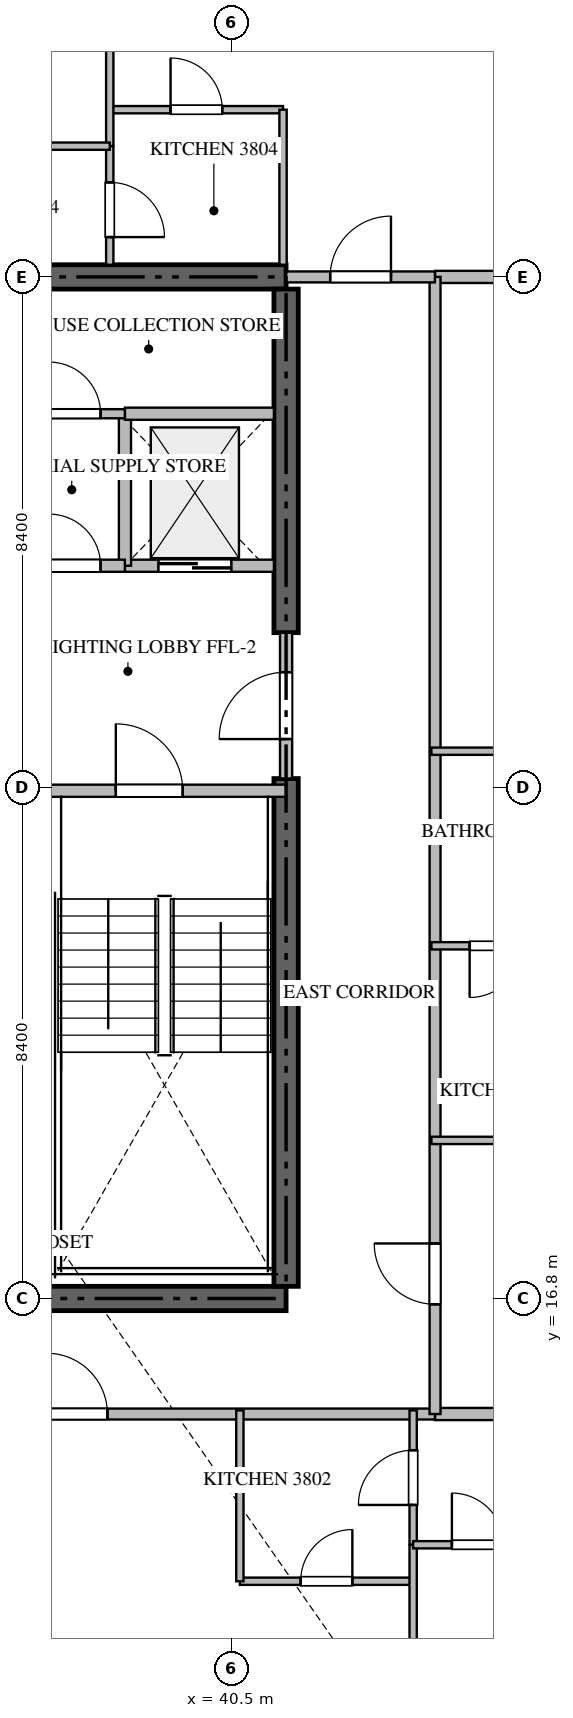
"""IFC4 building model, lengths in metres.
Left out: names, types, materials, properties, quantities, classifications, styles, units other than length and angle.
Written with IfcOpenShell. Run it as: python <this file> out.ifc"""

import sys

from ifc_helpers import new_model, si_unit, direction, frame, frame_2d, origin, place, context, subcontext, project, spatial, rectangle, extrude, source, transform, mapped, element, fill, save


model = new_model("IFC4")
c1 = context("Model", 3, precision=1e-05, world=origin(), true_north=direction((0.0, 1.0)))
c2 = subcontext(c1, "Body", "Model", "MODEL_VIEW")
j1 = project(units=[si_unit("LENGTHUNIT", "METRE"), si_unit("PLANEANGLEUNIT", "RADIAN")], contexts=[c1])
p1 = place(None, origin())
s1 = spatial("IfcSite", under=j1, at=p1, CompositionType="ELEMENT")
p2 = place(p1, origin())
s2 = spatial("IfcBuilding", under=s1, at=p2, CompositionType="ELEMENT")
p3 = place(p2, frame((0.0, 0.0, 153.9)))
s3 = spatial("IfcBuildingStorey", under=s2, at=p3, CompositionType="ELEMENT", Elevation=153.9)
for number, where, z_axis, x_axis in (
    (1, (23.4, 16.8, -0.26), (0.0, 0.0, 1.0), (1.0, 0.0, 0.0)),
    (2, (41.4, 33.6, -0.26), (0.0, 0.0, 1.0), (-1.0, 0.0, 0.0)),
):
    element("IfcWall", number, at=place(p3, frame(where, z_axis=z_axis, x_axis=x_axis)), inside=s3, PredefinedType="SHEAR", context=c2, shape_type="SweptSolid", body=[
        extrude(rectangle(XDim=18.0, YDim=0.4, at=frame_2d((9.0, 0.0))), origin(), (0.0, 0.0, 1.0), 3.748),
    ])
p4 = place(p3, frame((41.4, 17.0, -0.26), z_axis=(0.0, 0.0, 1.0), x_axis=(0.0, 1.0, 0.0)))
e3 = element("IfcWall", 3, at=p4, inside=s3, PredefinedType="SHEAR", context=c2, shape_type="SweptSolid", body=[
    extrude(rectangle(XDim=8.35, YDim=0.4, at=frame_2d((4.175, 0.0))), origin(), (0.0, 0.0, 1.0), 3.748),
])
p5 = place(p3, frame((41.4, 27.75, -0.26), z_axis=(0.0, 0.0, 1.0), x_axis=(0.0, 1.0, 0.0)))
e4 = element("IfcWall", 4, at=p5, inside=s3, PredefinedType="SHEAR", context=c2, shape_type="SweptSolid", body=[
    extrude(rectangle(XDim=5.65, YDim=0.4, at=frame_2d((2.825, 0.0))), origin(), (0.0, 0.0, 1.0), 3.748),
])
p6 = place(p3, frame((36.95, 25.15, 0.0), z_axis=(0.0, 0.0, 1.0), x_axis=(1.0, 0.0, 0.0)))
e5 = element("IfcWall", 5, at=p6, inside=s3, PredefinedType="STANDARD", context=c2, shape_type="SweptSolid", body=[
    extrude(rectangle(XDim=4.45, YDim=0.2, at=frame_2d((2.225, 0.0))), origin(), (0.0, 0.0, 1.0), 3.49),
])
p7 = place(p6, frame((1.65, 0.0, 0.0)))
e6 = element("IfcOpeningElement", 6, at=p7, cuts=e5, PredefinedType="OPENING", context=c2, shape_type="SweptSolid", body=[
    extrude(rectangle(XDim=1.1, YDim=2.15, at=frame_2d((0.55, 1.075))), frame((0.0, 0.11, 0.0), z_axis=(0.0, -1.0, 0.0), x_axis=(1.0, 0.0, 0.0)), (0.0, 0.0, 1.0), 0.22),
])
p8 = place(p3, frame((38.75, 28.85, 0.0), z_axis=(0.0, 0.0, 1.0), x_axis=(1.0, 0.0, 0.0)))
e7 = element("IfcWall", 7, at=p8, inside=s3, PredefinedType="STANDARD", context=c2, shape_type="SweptSolid", body=[
    extrude(rectangle(XDim=2.45, YDim=0.2, at=frame_2d((1.225, 0.0))), origin(), (0.0, 0.0, 1.0), 3.49),
])
p9 = place(p8, frame((0.55, 0.0, 0.0)))
e8 = element("IfcOpeningElement", 8, at=p9, cuts=e7, PredefinedType="OPENING", context=c2, shape_type="SweptSolid", body=[
    extrude(rectangle(XDim=1.2, YDim=2.2, at=frame_2d((0.6, 1.1))), frame((0.0, 0.11, 0.0), z_axis=(0.0, -1.0, 0.0), x_axis=(1.0, 0.0, 0.0)), (0.0, 0.0, 1.0), 0.22),
])
p10 = place(p3, frame((38.75, 28.85, 0.0), z_axis=(0.0, 0.0, 1.0), x_axis=(0.0, 1.0, 0.0)))
e9 = element("IfcWall", 9, at=p10, inside=s3, PredefinedType="STANDARD", context=c2, shape_type="SweptSolid", body=[
    extrude(rectangle(XDim=2.5, YDim=0.2, at=frame_2d((1.25, 0.0))), origin(), (0.0, 0.0, 1.0), 3.49),
])
p11 = place(p3, frame((38.75, 31.35, 0.0), z_axis=(0.0, 0.0, 1.0), x_axis=(1.0, 0.0, 0.0)))
e10 = element("IfcWall", 10, at=p11, inside=s3, PredefinedType="STANDARD", context=c2, shape_type="SweptSolid", body=[
    extrude(rectangle(XDim=2.45, YDim=0.2, at=frame_2d((1.225, 0.0))), origin(), (0.0, 0.0, 1.0), 3.49),
])
p12 = place(p3, frame((37.1, 28.85, 0.0), z_axis=(0.0, 0.0, 1.0), x_axis=(1.0, 0.0, 0.0)))
e11 = element("IfcWall", 11, at=p12, inside=s3, PredefinedType="STANDARD", context=c2, shape_type="SweptSolid", body=[
    extrude(rectangle(XDim=1.648, YDim=0.2, at=frame_2d((0.824, 0.0))), origin(), (0.0, 0.0, 1.0), 3.49),
])
p13 = place(p12, frame((0.399, 0.0, 0.0)))
e12 = element("IfcOpeningElement", 12, at=p13, cuts=e11, PredefinedType="OPENING", context=c2, shape_type="SweptSolid", body=[
    extrude(rectangle(XDim=0.85, YDim=2.1, at=frame_2d((0.425, 1.05))), frame((0.0, 0.11, 0.0), z_axis=(0.0, -1.0, 0.0), x_axis=(1.0, 0.0, 0.0)), (0.0, 0.0, 1.0), 0.22),
])
p14 = place(p3, frame((41.4, 25.352, 0.0), z_axis=(0.0, 0.0, 1.0), x_axis=(0.0, 1.0, 0.0)))
e13 = element("IfcWall", 13, at=p14, inside=s3, PredefinedType="STANDARD", context=c2, shape_type="SweptSolid", body=[
    extrude(rectangle(XDim=2.396, YDim=0.2, at=frame_2d((1.198, 0.0))), origin(), (0.0, 0.0, 1.0), 3.49),
])
p15 = place(p14, frame((0.648, 0.0, 0.0)))
e14 = element("IfcOpeningElement", 14, at=p15, cuts=e13, PredefinedType="OPENING", context=c2, shape_type="SweptSolid", body=[
    extrude(rectangle(XDim=1.1, YDim=2.15, at=frame_2d((0.55, 1.075))), frame((0.0, 0.11, 0.0), z_axis=(0.0, -1.0, 0.0), x_axis=(1.0, 0.0, 0.0)), (0.0, 0.0, 1.0), 0.22),
])
p16 = place(p3, frame((37.1, 31.35, 0.0), z_axis=(0.0, 0.0, 1.0), x_axis=(1.0, 0.0, 0.0)))
e15 = element("IfcWall", 15, at=p16, inside=s3, PredefinedType="PARTITIONING", context=c2, shape_type="SweptSolid", body=[
    extrude(rectangle(XDim=1.648, YDim=0.15, at=frame_2d((0.824, 0.0))), origin(), (0.0, 0.0, 1.0), 3.49),
])
p17 = place(p16, frame((0.399, 0.0, 0.0)))
e16 = element("IfcOpeningElement", 16, at=p17, cuts=e15, PredefinedType="OPENING", context=c2, shape_type="SweptSolid", body=[
    extrude(rectangle(XDim=0.85, YDim=2.1, at=frame_2d((0.425, 1.05))), frame((0.0, 0.085, 0.0), z_axis=(0.0, -1.0, 0.0), x_axis=(1.0, 0.0, 0.0)), (0.0, 0.0, 1.0), 0.17),
])
for number, where, z_axis, x_axis in (
    (17, (43.85, 14.9, 0.0), (0.0, 0.0, 1.0), (1.0, 0.0, 0.0)),
    (18, (43.85, 33.6, 0.0), (0.0, 0.0, 1.0), (1.0, 0.0, 0.0)),
):
    element("IfcWall", number, at=place(p3, frame(where, z_axis=z_axis, x_axis=x_axis)), inside=s3, PredefinedType="PARTITIONING", context=c2, shape_type="SweptSolid", body=[
        extrude(rectangle(XDim=13.068, YDim=0.2, at=frame_2d((6.534, 0.0))), origin(), (0.0, 0.0, 1.0), 3.49),
    ])
p18 = place(p3, frame((20.952, 14.9, 0.0), z_axis=(0.0, 0.0, 1.0), x_axis=(1.0, 0.0, 0.0)))
e19 = element("IfcWall", 19, at=p18, inside=s3, PredefinedType="PARTITIONING", context=c2, shape_type="SweptSolid", body=[
    extrude(rectangle(XDim=22.896, YDim=0.18, at=frame_2d((11.448, 0.0))), origin(), (0.0, 0.0, 1.0), 3.49),
])
p19 = place(p18, frame((5.934, 0.0, 0.0)))
e20 = element("IfcOpeningElement", 20, at=p19, cuts=e19, PredefinedType="OPENING", context=c2, shape_type="SweptSolid", body=[
    extrude(rectangle(XDim=1.0, YDim=2.15, at=frame_2d((0.5, 1.075))), frame((0.0, 0.1, 0.0), z_axis=(0.0, -1.0, 0.0), x_axis=(1.0, 0.0, 0.0)), (0.0, 0.0, 1.0), 0.2),
])
p20 = place(p18, frame((16.51, 0.0, 0.0)))
e21 = element("IfcOpeningElement", 21, at=p20, cuts=e19, PredefinedType="OPENING", context=c2, shape_type="SweptSolid", body=[
    extrude(rectangle(XDim=1.0, YDim=2.15, at=frame_2d((0.5, 1.075))), frame((0.0, 0.1, 0.0), z_axis=(0.0, -1.0, 0.0), x_axis=(1.0, 0.0, 0.0)), (0.0, 0.0, 1.0), 0.2),
])
p21 = place(p3, frame((43.85, 14.9, 0.0), z_axis=(0.0, 0.0, 1.0), x_axis=(0.0, 1.0, 0.0)))
e22 = element("IfcWall", 22, at=p21, inside=s3, PredefinedType="PARTITIONING", context=c2, shape_type="SweptSolid", body=[
    extrude(rectangle(XDim=18.7, YDim=0.18, at=frame_2d((9.35, 0.0))), origin(), (0.0, 0.0, 1.0), 3.49),
])
p22 = place(p21, frame((1.805, 0.0, 0.0)))
e23 = element("IfcOpeningElement", 23, at=p22, cuts=e22, PredefinedType="OPENING", context=c2, shape_type="SweptSolid", body=[
    extrude(rectangle(XDim=1.0, YDim=2.15, at=frame_2d((0.5, 1.075))), frame((0.0, 0.1, 0.0), z_axis=(0.0, -1.0, 0.0), x_axis=(1.0, 0.0, 0.0)), (0.0, 0.0, 1.0), 0.2),
])
p23 = place(p3, frame((41.402, 33.6, 0.0), z_axis=(0.0, 0.0, 1.0), x_axis=(1.0, 0.0, 0.0)))
e24 = element("IfcWall", 24, at=p23, inside=s3, PredefinedType="PARTITIONING", context=c2, shape_type="SweptSolid", body=[
    extrude(rectangle(XDim=2.446, YDim=0.18, at=frame_2d((1.223, 0.0))), origin(), (0.0, 0.0, 1.0), 3.49),
])
p24 = place(p23, frame((0.723, 0.0, 0.0)))
e25 = element("IfcOpeningElement", 25, at=p24, cuts=e24, PredefinedType="OPENING", context=c2, shape_type="SweptSolid", body=[
    extrude(rectangle(XDim=1.0, YDim=2.15, at=frame_2d((0.5, 1.075))), frame((0.0, 0.1, 0.0), z_axis=(0.0, -1.0, 0.0), x_axis=(1.0, 0.0, 0.0)), (0.0, 0.0, 1.0), 0.2),
])
p25 = place(p3, frame((40.64, 12.15, 0.0), z_axis=(0.0, 0.0, 1.0), x_axis=(1.0, 0.0, 0.0)))
e26 = element("IfcWall", 26, at=p25, inside=s3, PredefinedType="PARTITIONING", context=c2, shape_type="SweptSolid", body=[
    extrude(rectangle(XDim=2.85, YDim=0.12, at=frame_2d((1.425, 0.0))), origin(), (0.0, 0.0, 1.0), 3.49),
])
p26 = place(p25, frame((1.0, 0.0, 0.0)))
e27 = element("IfcOpeningElement", 27, at=p26, cuts=e26, PredefinedType="OPENING", context=c2, shape_type="SweptSolid", body=[
    extrude(rectangle(XDim=0.85, YDim=2.1, at=frame_2d((0.425, 1.05))), frame((0.0, 0.07, 0.0), z_axis=(0.0, -1.0, 0.0), x_axis=(1.0, 0.0, 0.0)), (0.0, 0.0, 1.0), 0.14),
])
p27 = place(p3, frame((40.64, 12.15, 0.0), z_axis=(0.0, 0.0, 1.0), x_axis=(0.0, 1.0, 0.0)))
e28 = element("IfcWall", 28, at=p27, inside=s3, PredefinedType="PARTITIONING", context=c2, shape_type="SweptSolid", body=[
    extrude(rectangle(XDim=2.81, YDim=0.12, at=frame_2d((1.405, 0.0))), origin(), (0.0, 0.0, 1.0), 3.49),
])
p28 = place(p3, frame((43.49, 12.75, 0.0), z_axis=(0.0, 0.0, 1.0), x_axis=(0.0, 1.0, 0.0)))
e29 = element("IfcWall", 29, at=p28, inside=s3, PredefinedType="PARTITIONING", context=c2, shape_type="SweptSolid", body=[
    extrude(rectangle(XDim=2.21, YDim=0.12, at=frame_2d((1.105, 0.0))), origin(), (0.0, 0.0, 1.0), 3.49),
])
p29 = place(p28, frame((0.655, 0.0, 0.0)))
e30 = element("IfcOpeningElement", 30, at=p29, cuts=e29, PredefinedType="OPENING", context=c2, shape_type="SweptSolid", body=[
    extrude(rectangle(XDim=0.9, YDim=2.1, at=frame_2d((0.45, 1.05))), frame((0.0, 0.07, 0.0), z_axis=(0.0, -1.0, 0.0), x_axis=(1.0, 0.0, 0.0)), (0.0, 0.0, 1.0), 0.14),
])
p30 = place(p3, frame((43.49, 8.473, 0.0), z_axis=(0.0, 0.0, 1.0), x_axis=(0.0, 1.0, 0.0)))
e31 = element("IfcWall", 31, at=p30, inside=s3, PredefinedType="PARTITIONING", context=c2, shape_type="SweptSolid", body=[
    extrude(rectangle(XDim=4.275, YDim=0.12, at=frame_2d((2.138, 0.0))), origin(), (0.0, 0.0, 1.0), 3.49),
])
p31 = place(p3, frame((43.49, 12.75, 0.0), z_axis=(0.0, 0.0, 1.0), x_axis=(1.0, 0.0, 0.0)))
e32 = element("IfcWall", 32, at=p31, inside=s3, PredefinedType="PARTITIONING", context=c2, shape_type="SweptSolid", body=[
    extrude(rectangle(XDim=2.125, YDim=0.12, at=frame_2d((1.062, 0.0))), origin(), (0.0, 0.0, 1.0), 3.49),
])
p32 = place(p31, frame((0.637, 0.0, 0.0)))
e33 = element("IfcOpeningElement", 33, at=p32, cuts=e32, PredefinedType="OPENING", context=c2, shape_type="SweptSolid", body=[
    extrude(rectangle(XDim=0.85, YDim=2.1, at=frame_2d((0.425, 1.05))), frame((0.0, 0.07, 0.0), z_axis=(0.0, -1.0, 0.0), x_axis=(1.0, 0.0, 0.0)), (0.0, 0.0, 1.0), 0.14),
])
p33 = place(p3, frame((38.5, 36.35, 0.0), z_axis=(0.0, 0.0, 1.0), x_axis=(1.0, 0.0, 0.0)))
e34 = element("IfcWall", 34, at=p33, inside=s3, PredefinedType="PARTITIONING", context=c2, shape_type="SweptSolid", body=[
    extrude(rectangle(XDim=2.85, YDim=0.12, at=frame_2d((1.425, 0.0))), origin(), (0.0, 0.0, 1.0), 3.49),
])
p34 = place(p33, frame((1.0, 0.0, 0.0)))
e35 = element("IfcOpeningElement", 35, at=p34, cuts=e34, PredefinedType="OPENING", context=c2, shape_type="SweptSolid", body=[
    extrude(rectangle(XDim=0.85, YDim=2.1, at=frame_2d((0.425, 1.05))), frame((0.0, 0.07, 0.0), z_axis=(0.0, -1.0, 0.0), x_axis=(1.0, 0.0, 0.0)), (0.0, 0.0, 1.0), 0.14),
])
p35 = place(p3, frame((41.35, 36.35, 0.0), z_axis=(0.0, 0.0, 1.0), x_axis=(0.0, -1.0, 0.0)))
e36 = element("IfcWall", 36, at=p35, inside=s3, PredefinedType="PARTITIONING", context=c2, shape_type="SweptSolid", body=[
    extrude(rectangle(XDim=2.55, YDim=0.12, at=frame_2d((1.275, 0.0))), origin(), (0.0, 0.0, 1.0), 3.49),
])
p36 = place(p3, frame((38.5, 35.75, 0.0), z_axis=(0.0, 0.0, 1.0), x_axis=(0.0, -1.0, 0.0)))
e37 = element("IfcWall", 37, at=p36, inside=s3, PredefinedType="PARTITIONING", context=c2, shape_type="SweptSolid", body=[
    extrude(rectangle(XDim=1.95, YDim=0.12, at=frame_2d((0.975, 0.0))), origin(), (0.0, 0.0, 1.0), 3.49),
])
p37 = place(p36, frame((0.595, 0.0, 0.0)))
e38 = element("IfcOpeningElement", 38, at=p37, cuts=e37, PredefinedType="OPENING", context=c2, shape_type="SweptSolid", body=[
    extrude(rectangle(XDim=0.9, YDim=2.1, at=frame_2d((0.45, 1.05))), frame((0.0, 0.07, 0.0), z_axis=(0.0, -1.0, 0.0), x_axis=(1.0, 0.0, 0.0)), (0.0, 0.0, 1.0), 0.14),
])
p38 = place(p3, frame((38.5, 42.296, 0.0), z_axis=(0.0, 0.0, 1.0), x_axis=(0.0, -1.0, 0.0)))
e39 = element("IfcWall", 39, at=p38, inside=s3, PredefinedType="PARTITIONING", context=c2, shape_type="SweptSolid", body=[
    extrude(rectangle(XDim=6.544, YDim=0.12, at=frame_2d((3.272, 0.0))), origin(), (0.0, 0.0, 1.0), 3.49),
])
p39 = place(p3, frame((35.482, 35.75, 0.0), z_axis=(0.0, 0.0, 1.0), x_axis=(1.0, 0.0, 0.0)))
e40 = element("IfcWall", 40, at=p39, inside=s3, PredefinedType="PARTITIONING", context=c2, shape_type="SweptSolid", body=[
    extrude(rectangle(XDim=3.018, YDim=0.12, at=frame_2d((1.509, 0.0))), origin(), (0.0, 0.0, 1.0), 3.49),
])
p40 = place(p39, frame((1.084, 0.0, 0.0)))
e41 = element("IfcOpeningElement", 41, at=p40, cuts=e40, PredefinedType="OPENING", context=c2, shape_type="SweptSolid", body=[
    extrude(rectangle(XDim=0.85, YDim=2.1, at=frame_2d((0.425, 1.05))), frame((0.0, 0.07, 0.0), z_axis=(0.0, -1.0, 0.0), x_axis=(1.0, 0.0, 0.0)), (0.0, 0.0, 1.0), 0.14),
])
p41 = place(p3, frame((46.6, 19.4, 0.0), z_axis=(0.0, 0.0, 1.0), x_axis=(-1.0, 0.0, 0.0)))
e42 = element("IfcWall", 42, at=p41, inside=s3, PredefinedType="PARTITIONING", context=c2, shape_type="SweptSolid", body=[
    extrude(rectangle(XDim=2.81, YDim=0.12, at=frame_2d((1.405, 0.0))), origin(), (0.0, 0.0, 1.0), 3.49),
])
p42 = place(p3, frame((45.9, 25.8, 0.0), z_axis=(0.0, 0.0, 1.0), x_axis=(-1.0, 0.0, 0.0)))
e43 = element("IfcWall", 43, at=p42, inside=s3, PredefinedType="PARTITIONING", context=c2, shape_type="SweptSolid", body=[
    extrude(rectangle(XDim=2.11, YDim=0.12, at=frame_2d((1.055, 0.0))), origin(), (0.0, 0.0, 1.0), 3.49),
])
p43 = place(p3, frame((45.898, 22.6, 0.0), z_axis=(0.0, 0.0, 1.0), x_axis=(-1.0, 0.0, 0.0)))
e44 = element("IfcWall", 44, at=p43, inside=s3, PredefinedType="PARTITIONING", context=c2, shape_type="SweptSolid", body=[
    extrude(rectangle(XDim=2.108, YDim=0.12, at=frame_2d((1.054, 0.0))), origin(), (0.0, 0.0, 1.0), 3.49),
])
p44 = place(p43, frame((0.629, 0.0, 0.0)))
e45 = element("IfcOpeningElement", 45, at=p44, cuts=e44, PredefinedType="OPENING", context=c2, shape_type="SweptSolid", body=[
    extrude(rectangle(XDim=0.85, YDim=2.1, at=frame_2d((0.425, 1.05))), frame((0.0, 0.07, 0.0), z_axis=(0.0, -1.0, 0.0), x_axis=(1.0, 0.0, 0.0)), (0.0, 0.0, 1.0), 0.14),
])
m1 = source(origin(), c2, "Body", "SweptSolid", [
    extrude(rectangle(XDim=1.1, YDim=2.15, at=frame_2d((0.55, 1.075))), frame((0.0, 0.025, 0.0), z_axis=(0.0, -1.0, 0.0), x_axis=(1.0, 0.0, 0.0)), (0.0, 0.0, 1.0), 0.05),
])
p45 = place(p7, origin())
e46 = element("IfcDoor", 46, at=p45, inside=s3, OperationType="SINGLE_SWING_LEFT", PredefinedType="DOOR", context=c2, shape_type="MappedRepresentation", body=[
    mapped(m1, transform((0.0, 0.0, 0.0), scale=1.0)),
])
fill(e6, e46)
m2 = source(origin(), c2, "Body", "SweptSolid", [
    extrude(rectangle(XDim=1.2, YDim=2.2, at=frame_2d((0.6, 1.1))), frame((0.0, 0.025, 0.0), z_axis=(0.0, -1.0, 0.0), x_axis=(1.0, 0.0, 0.0)), (0.0, 0.0, 1.0), 0.05),
])
p46 = place(p9, origin())
e47 = element("IfcDoor", 47, at=p46, inside=s3, OperationType="DOUBLE_DOOR_SLIDING", PredefinedType="DOOR", context=c2, shape_type="MappedRepresentation", body=[
    mapped(m2, transform((0.0, 0.0, 0.0), scale=1.0)),
])
fill(e8, e47)
m3 = source(origin(), c2, "Body", "SweptSolid", [
    extrude(rectangle(XDim=0.85, YDim=2.1, at=frame_2d((0.425, 1.05))), frame((0.0, 0.025, 0.0), z_axis=(0.0, -1.0, 0.0), x_axis=(1.0, 0.0, 0.0)), (0.0, 0.0, 1.0), 0.05),
])
p47 = place(p13, origin())
e48 = element("IfcDoor", 48, at=p47, inside=s3, OperationType="SINGLE_SWING_LEFT", PredefinedType="DOOR", context=c2, shape_type="MappedRepresentation", body=[
    mapped(m3, transform((0.0, 0.0, 0.0), scale=1.0)),
])
fill(e12, e48)
p48 = place(p15, origin())
e49 = element("IfcDoor", 49, at=p48, inside=s3, OperationType="SINGLE_SWING_LEFT", PredefinedType="DOOR", context=c2, shape_type="MappedRepresentation", body=[
    mapped(m1, transform((0.0, 0.0, 0.0), scale=1.0)),
])
fill(e14, e49)
p49 = place(p17, origin())
e50 = element("IfcDoor", 50, at=p49, inside=s3, OperationType="SINGLE_SWING_LEFT", PredefinedType="DOOR", context=c2, shape_type="MappedRepresentation", body=[
    mapped(m3, transform((0.0, 0.0, 0.0), scale=1.0)),
])
fill(e16, e50)
m4 = source(origin(), c2, "Body", "SweptSolid", [
    extrude(rectangle(XDim=1.0, YDim=2.15, at=frame_2d((0.5, 1.075))), frame((0.0, 0.025, 0.0), z_axis=(0.0, -1.0, 0.0), x_axis=(1.0, 0.0, 0.0)), (0.0, 0.0, 1.0), 0.05),
])
p50 = place(p20, origin())
e51 = element("IfcDoor", 51, at=p50, inside=s3, OperationType="SINGLE_SWING_LEFT", PredefinedType="DOOR", context=c2, shape_type="MappedRepresentation", body=[
    mapped(m4, transform((0.0, 0.0, 0.0), scale=1.0)),
])
fill(e21, e51)
p51 = place(p22, origin())
e52 = element("IfcDoor", 52, at=p51, inside=s3, OperationType="SINGLE_SWING_RIGHT", PredefinedType="DOOR", context=c2, shape_type="MappedRepresentation", body=[
    mapped(m4, transform((0.0, 0.0, 0.0), scale=1.0)),
])
fill(e23, e52)
p52 = place(p24, origin())
e53 = element("IfcDoor", 53, at=p52, inside=s3, OperationType="SINGLE_SWING_RIGHT", PredefinedType="DOOR", context=c2, shape_type="MappedRepresentation", body=[
    mapped(m4, transform((0.0, 0.0, 0.0), scale=1.0)),
])
fill(e25, e53)
p53 = place(p26, origin())
e54 = element("IfcDoor", 54, at=p53, inside=s3, OperationType="SINGLE_SWING_RIGHT", PredefinedType="DOOR", context=c2, shape_type="MappedRepresentation", body=[
    mapped(m3, transform((0.0, 0.0, 0.0), scale=1.0)),
])
fill(e27, e54)
m5 = source(origin(), c2, "Body", "SweptSolid", [
    extrude(rectangle(XDim=0.9, YDim=2.1, at=frame_2d((0.45, 1.05))), frame((0.0, 0.025, 0.0), z_axis=(0.0, -1.0, 0.0), x_axis=(1.0, 0.0, 0.0)), (0.0, 0.0, 1.0), 0.05),
])
p54 = place(p29, origin())
e55 = element("IfcDoor", 55, at=p54, inside=s3, OperationType="SINGLE_SWING_LEFT", PredefinedType="DOOR", context=c2, shape_type="MappedRepresentation", body=[
    mapped(m5, transform((0.0, 0.0, 0.0), scale=1.0)),
])
fill(e30, e55)
p55 = place(p32, origin())
e56 = element("IfcDoor", 56, at=p55, inside=s3, OperationType="SINGLE_SWING_LEFT", PredefinedType="DOOR", context=c2, shape_type="MappedRepresentation", body=[
    mapped(m3, transform((0.0, 0.0, 0.0), scale=1.0)),
])
fill(e33, e56)
p56 = place(p34, origin())
e57 = element("IfcDoor", 57, at=p56, inside=s3, OperationType="SINGLE_SWING_LEFT", PredefinedType="DOOR", context=c2, shape_type="MappedRepresentation", body=[
    mapped(m3, transform((0.0, 0.0, 0.0), scale=1.0)),
])
fill(e35, e57)
p57 = place(p37, origin())
e58 = element("IfcDoor", 58, at=p57, inside=s3, OperationType="SINGLE_SWING_RIGHT", PredefinedType="DOOR", context=c2, shape_type="MappedRepresentation", body=[
    mapped(m5, transform((0.0, 0.0, 0.0), scale=1.0)),
])
fill(e38, e58)
p58 = place(p44, origin())
e59 = element("IfcDoor", 59, at=p58, inside=s3, OperationType="SINGLE_SWING_RIGHT", PredefinedType="DOOR", context=c2, shape_type="MappedRepresentation", body=[
    mapped(m3, transform((0.0, 0.0, 0.0), scale=1.0)),
])
fill(e45, e59)
save(model, sys.argv[1])
